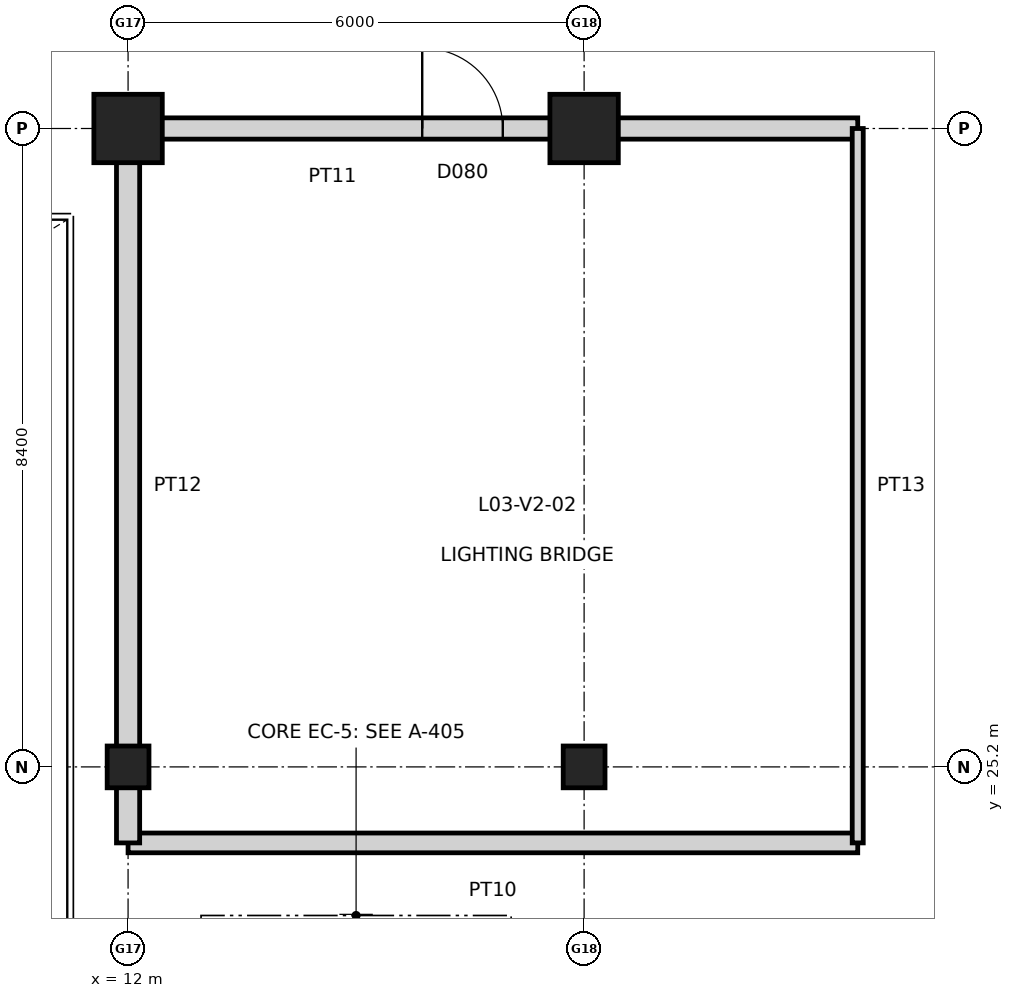
"""IFC4 building model, lengths in metres.
Left out: names, types, materials, properties, quantities, classifications, styles, units other than length and angle.
Written with IfcOpenShell. Run it as: python <this file> out.ifc"""

import sys

from ifc_helpers import new_model, si_unit, direction, frame, frame_2d, origin, origin_2d, place, context, subcontext, project, spatial, rectangle, extrude, element, fill, save


model = new_model("IFC4")
c1 = context("Model", 3, precision=1e-05, world=origin(), true_north=direction((0.0, 1.0)))
c2 = subcontext(c1, "Body", "Model", "MODEL_VIEW")
j1 = project(units=[si_unit("LENGTHUNIT", "METRE"), si_unit("PLANEANGLEUNIT", "RADIAN")], contexts=[c1])
p1 = place(None, origin())
s1 = spatial("IfcSite", under=j1, at=p1, CompositionType="ELEMENT")
p2 = place(p1, origin())
s2 = spatial("IfcBuilding", under=s1, at=p2, CompositionType="ELEMENT")
p3 = place(p2, frame((0.0, 0.0, 15.0)))
s3 = spatial("IfcBuildingStorey", under=s2, at=p3, CompositionType="ELEMENT", Elevation=15.0)
p4 = place(p3, frame((12.0, 25.2, 0.0), z_axis=(0.0, 0.0, 1.0), x_axis=(1.0, 0.0, 0.0)))
e1 = element("IfcColumn", 1, at=p4, inside=s3, PredefinedType="COLUMN", context=c2, shape_type="SweptSolid", body=[
    extrude(rectangle(XDim=0.55, YDim=0.55, at=origin_2d()), origin(), (0.0, 0.0, 1.0), 4.8),
])
p5 = place(p3, frame((12.0, 33.6, 0.0), z_axis=(0.0, 0.0, 1.0), x_axis=(1.0, 0.0, 0.0)))
e2 = element("IfcColumn", 2, at=p5, inside=s3, PredefinedType="COLUMN", context=c2, shape_type="SweptSolid", body=[
    extrude(rectangle(XDim=0.9, YDim=0.9, at=origin_2d()), origin(), (0.0, 0.0, 1.0), 4.8),
])
p6 = place(p3, frame((18.0, 25.2, 0.0), z_axis=(0.0, 0.0, 1.0), x_axis=(1.0, 0.0, 0.0)))
e3 = element("IfcColumn", 3, at=p6, inside=s3, PredefinedType="COLUMN", context=c2, shape_type="SweptSolid", body=[
    extrude(rectangle(XDim=0.55, YDim=0.55, at=origin_2d()), origin(), (0.0, 0.0, 1.0), 4.8),
])
p7 = place(p3, frame((18.0, 33.6, 0.0), z_axis=(0.0, 0.0, 1.0), x_axis=(1.0, 0.0, 0.0)))
e4 = element("IfcColumn", 4, at=p7, inside=s3, PredefinedType="COLUMN", context=c2, shape_type="SweptSolid", body=[
    extrude(rectangle(XDim=0.9, YDim=0.9, at=origin_2d()), origin(), (0.0, 0.0, 1.0), 4.8),
])
p8 = place(p3, frame((12.0, 24.2, 0.0), z_axis=(0.0, 0.0, 1.0), x_axis=(1.0, 0.0, 0.0)))
e5 = element("IfcWall", 5, at=p8, inside=s3, PredefinedType="PARTITIONING", context=c2, shape_type="SweptSolid", body=[
    extrude(rectangle(XDim=9.6, YDim=0.26, at=frame_2d((4.8, 0.0))), origin(), (0.0, 0.0, 1.0), 4.42),
])
p9 = place(p3, frame((12.0, 33.6, 0.0), z_axis=(0.0, 0.0, 1.0), x_axis=(1.0, 0.0, 0.0)))
e6 = element("IfcWall", 6, at=p9, inside=s3, PredefinedType="PARTITIONING", context=c2, shape_type="SweptSolid", body=[
    extrude(rectangle(XDim=9.6, YDim=0.28, at=frame_2d((4.8, 0.0))), origin(), (0.0, 0.0, 1.0), 3.34),
])
p10 = place(p9, frame((3.87, 0.0, 0.0)))
e7 = element("IfcOpeningElement", 7, at=p10, cuts=e6, PredefinedType="OPENING", context=c2, shape_type="SweptSolid", body=[
    extrude(rectangle(XDim=1.06, YDim=2.15, at=frame_2d((0.53, 1.075))), frame((0.0, 0.15, 0.0), z_axis=(0.0, -1.0, 0.0), x_axis=(1.0, 0.0, 0.0)), (0.0, 0.0, 1.0), 0.3),
])
p11 = place(p3, frame((12.0, 24.2, 0.0), z_axis=(0.0, 0.0, 1.0), x_axis=(0.0, 1.0, 0.0)))
e8 = element("IfcWall", 8, at=p11, inside=s3, PredefinedType="PARTITIONING", context=c2, shape_type="SweptSolid", body=[
    extrude(rectangle(XDim=9.4, YDim=0.305, at=frame_2d((4.7, 0.0))), origin(), (0.0, 0.0, 1.0), 3.59),
])
p12 = place(p3, frame((21.6, 24.2, 0.0), z_axis=(0.0, 0.0, 1.0), x_axis=(0.0, 1.0, 0.0)))
e9 = element("IfcWall", 9, at=p12, inside=s3, PredefinedType="PARTITIONING", context=c2, shape_type="SweptSolid", body=[
    extrude(rectangle(XDim=9.4, YDim=0.145, at=frame_2d((4.7, 0.0))), origin(), (0.0, 0.0, 1.0), 4.42),
])
p13 = place(p10, origin())
e10 = element("IfcDoor", 10, at=p13, inside=s3, OperationType="SINGLE_SWING_LEFT", PredefinedType="DOOR", context=c2, shape_type="SweptSolid", body=[
    extrude(rectangle(XDim=1.06, YDim=2.15, at=frame_2d((0.53, 1.075))), frame((0.0, 0.025, 0.0), z_axis=(0.0, -1.0, 0.0), x_axis=(1.0, 0.0, 0.0)), (0.0, 0.0, 1.0), 0.05),
])
fill(e7, e10)
save(model, sys.argv[1])
